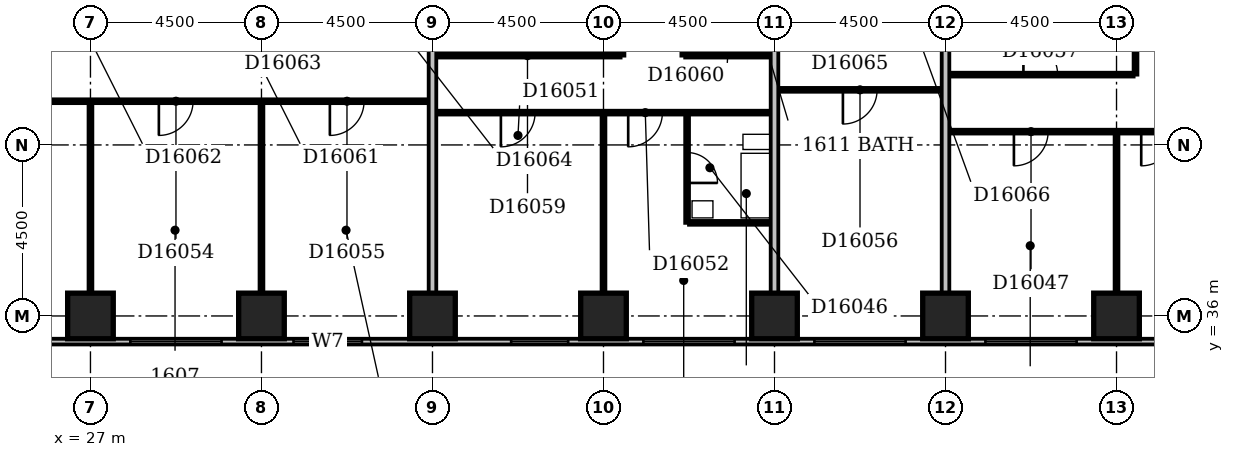
"""IFC4 building model, lengths in metres.
Left out: names, types, materials, properties, quantities, classifications, styles, units other than length and angle.
Written with IfcOpenShell. Run it as: python <this file> out.ifc"""

import sys

from ifc_helpers import new_model, si_unit, direction, frame, frame_2d, origin, origin_2d, place, context, subcontext, project, spatial, rectangle, extrude, element, fill, save


model = new_model("IFC4")
c1 = context("Model", 3, precision=1e-05, world=origin(), true_north=direction((0.0, 1.0)))
c2 = subcontext(c1, "Body", "Model", "MODEL_VIEW")
j1 = project(units=[si_unit("LENGTHUNIT", "METRE"), si_unit("PLANEANGLEUNIT", "RADIAN")], contexts=[c1])
p1 = place(None, origin())
s1 = spatial("IfcSite", under=j1, at=p1, CompositionType="ELEMENT")
p2 = place(p1, origin())
s2 = spatial("IfcBuilding", under=s1, at=p2, CompositionType="ELEMENT")
p3 = place(p2, frame((0.0, 0.0, 68.6)))
s3 = spatial("IfcBuildingStorey", under=s2, at=p3, CompositionType="ELEMENT", Elevation=68.6)
for number, where, z_axis, x_axis in (
    (1, (27.0, 36.0, -0.3), (0.0, 0.0, 1.0), (1.0, 0.0, 0.0)),
    (2, (31.5, 36.0, -0.3), (0.0, 0.0, 1.0), (1.0, 0.0, 0.0)),
    (3, (36.0, 36.0, -0.3), (0.0, 0.0, 1.0), (1.0, 0.0, 0.0)),
    (4, (40.5, 36.0, -0.3), (0.0, 0.0, 1.0), (1.0, 0.0, 0.0)),
    (5, (45.0, 36.0, -0.3), (0.0, 0.0, 1.0), (1.0, 0.0, 0.0)),
    (6, (49.5, 36.0, -0.3), (0.0, 0.0, 1.0), (1.0, 0.0, 0.0)),
    (7, (54.0, 36.0, -0.3), (0.0, 0.0, 1.0), (1.0, 0.0, 0.0)),
):
    element("IfcColumn", number, at=place(p3, frame(where, z_axis=z_axis, x_axis=x_axis)), inside=s3, PredefinedType="COLUMN", context=c2, shape_type="SweptSolid", body=[
        extrude(rectangle(XDim=1.2, YDim=1.2, at=origin_2d()), origin(), (0.0, 0.0, 1.0), 3.6),
    ])
p4 = place(p3, frame((23.1, 35.325, 0.0), z_axis=(0.0, 0.0, 1.0), x_axis=(1.0, 0.0, 0.0)))
e8 = element("IfcWall", 8, at=p4, inside=s3, PredefinedType="STANDARD", context=c2, shape_type="SweptSolid", body=[
    extrude(rectangle(XDim=45.15, YDim=0.15, at=frame_2d((22.575, 0.0))), origin(), (0.0, 0.0, 1.0), 2.7),
])
p5 = place(p4, frame((0.45, 0.0, 0.6)))
e9 = element("IfcOpeningElement", 9, at=p5, cuts=e8, PredefinedType="OPENING", context=c2, shape_type="SweptSolid", body=[
    extrude(rectangle(XDim=2.4, YDim=1.8, at=frame_2d((1.2, 0.9))), frame((0.0, 0.087, 0.0), z_axis=(0.0, -1.0, 0.0), x_axis=(1.0, 0.0, 0.0)), (0.0, 0.0, 1.0), 0.174),
])
p6 = place(p4, frame((4.95, 0.0, 0.6)))
e10 = element("IfcOpeningElement", 10, at=p6, cuts=e8, PredefinedType="OPENING", context=c2, shape_type="SweptSolid", body=[
    extrude(rectangle(XDim=2.4, YDim=1.8, at=frame_2d((1.2, 0.9))), frame((0.0, 0.087, 0.0), z_axis=(0.0, -1.0, 0.0), x_axis=(1.0, 0.0, 0.0)), (0.0, 0.0, 1.0), 0.174),
])
p7 = place(p4, frame((9.243, 0.0, 0.6)))
e11 = element("IfcOpeningElement", 11, at=p7, cuts=e8, PredefinedType="OPENING", context=c2, shape_type="SweptSolid", body=[
    extrude(rectangle(XDim=1.8, YDim=1.8, at=frame_2d((0.9, 0.9))), frame((0.0, 0.087, 0.0), z_axis=(0.0, -1.0, 0.0), x_axis=(1.0, 0.0, 0.0)), (0.0, 0.0, 1.0), 0.174),
])
p8 = place(p4, frame((14.97, 0.0, 0.6)))
e12 = element("IfcOpeningElement", 12, at=p8, cuts=e8, PredefinedType="OPENING", context=c2, shape_type="SweptSolid", body=[
    extrude(rectangle(XDim=1.5, YDim=1.8, at=frame_2d((0.75, 0.9))), frame((0.0, 0.087, 0.0), z_axis=(0.0, -1.0, 0.0), x_axis=(1.0, 0.0, 0.0)), (0.0, 0.0, 1.0), 0.174),
])
p9 = place(p4, frame((18.45, 0.0, 0.6)))
e13 = element("IfcOpeningElement", 13, at=p9, cuts=e8, PredefinedType="OPENING", context=c2, shape_type="SweptSolid", body=[
    extrude(rectangle(XDim=2.4, YDim=1.8, at=frame_2d((1.2, 0.9))), frame((0.0, 0.087, 0.0), z_axis=(0.0, -1.0, 0.0), x_axis=(1.0, 0.0, 0.0)), (0.0, 0.0, 1.0), 0.174),
])
p10 = place(p4, frame((22.95, 0.0, 0.6)))
e14 = element("IfcOpeningElement", 14, at=p10, cuts=e8, PredefinedType="OPENING", context=c2, shape_type="SweptSolid", body=[
    extrude(rectangle(XDim=2.4, YDim=1.8, at=frame_2d((1.2, 0.9))), frame((0.0, 0.087, 0.0), z_axis=(0.0, -1.0, 0.0), x_axis=(1.0, 0.0, 0.0)), (0.0, 0.0, 1.0), 0.174),
])
p11 = place(p4, frame((27.45, 0.0, 0.6)))
e15 = element("IfcOpeningElement", 15, at=p11, cuts=e8, PredefinedType="OPENING", context=c2, shape_type="SweptSolid", body=[
    extrude(rectangle(XDim=2.4, YDim=1.8, at=frame_2d((1.2, 0.9))), frame((0.0, 0.087, 0.0), z_axis=(0.0, -1.0, 0.0), x_axis=(1.0, 0.0, 0.0)), (0.0, 0.0, 1.0), 0.174),
])
p12 = place(p4, frame((31.95, 0.0, 0.6)))
e16 = element("IfcOpeningElement", 16, at=p12, cuts=e8, PredefinedType="OPENING", context=c2, shape_type="SweptSolid", body=[
    extrude(rectangle(XDim=2.4, YDim=1.8, at=frame_2d((1.2, 0.9))), frame((0.0, 0.087, 0.0), z_axis=(0.0, -1.0, 0.0), x_axis=(1.0, 0.0, 0.0)), (0.0, 0.0, 1.0), 0.174),
])
p13 = place(p4, frame((36.45, 0.0, 0.6)))
e17 = element("IfcOpeningElement", 17, at=p13, cuts=e8, PredefinedType="OPENING", context=c2, shape_type="SweptSolid", body=[
    extrude(rectangle(XDim=2.4, YDim=1.8, at=frame_2d((1.2, 0.9))), frame((0.0, 0.087, 0.0), z_axis=(0.0, -1.0, 0.0), x_axis=(1.0, 0.0, 0.0)), (0.0, 0.0, 1.0), 0.174),
])
p14 = place(p4, frame((40.706, 0.0, 0.6)))
e18 = element("IfcOpeningElement", 18, at=p14, cuts=e8, PredefinedType="OPENING", context=c2, shape_type="SweptSolid", body=[
    extrude(rectangle(XDim=1.2, YDim=1.8, at=frame_2d((0.6, 0.9))), frame((0.0, 0.087, 0.0), z_axis=(0.0, -1.0, 0.0), x_axis=(1.0, 0.0, 0.0)), (0.0, 0.0, 1.0), 0.174),
])
p15 = place(p3, frame((27.0, 36.6, 0.0), z_axis=(0.0, 0.0, 1.0), x_axis=(0.0, 1.0, 0.0)))
e19 = element("IfcWall", 19, at=p15, inside=s3, PredefinedType="PARTITIONING", context=c2, shape_type="SweptSolid", body=[
    extrude(rectangle(XDim=5.0, YDim=0.1, at=frame_2d((2.5, 0.0))), origin(), (0.0, 0.0, 1.0), 2.6),
])
p16 = place(p3, frame((31.5, 36.6, 0.0), z_axis=(0.0, 0.0, 1.0), x_axis=(0.0, 1.0, 0.0)))
e20 = element("IfcWall", 20, at=p16, inside=s3, PredefinedType="PARTITIONING", context=c2, shape_type="SweptSolid", body=[
    extrude(rectangle(XDim=5.0, YDim=0.1, at=frame_2d((2.5, 0.0))), origin(), (0.0, 0.0, 1.0), 3.3),
])
p17 = place(p3, frame((36.0, 36.6, 0.0), z_axis=(0.0, 0.0, 1.0), x_axis=(0.0, 1.0, 0.0)))
e21 = element("IfcWall", 21, at=p17, inside=s3, PredefinedType="PARTITIONING", context=c2, shape_type="SweptSolid", body=[
    extrude(rectangle(XDim=12.8, YDim=0.2, at=frame_2d((6.4, 0.0))), origin(), (0.0, 0.0, 1.0), 2.4),
])
p18 = place(p3, frame((40.5, 36.6, 0.0), z_axis=(0.0, 0.0, 1.0), x_axis=(0.0, 1.0, 0.0)))
e22 = element("IfcWall", 22, at=p18, inside=s3, PredefinedType="PARTITIONING", context=c2, shape_type="SweptSolid", body=[
    extrude(rectangle(XDim=4.7, YDim=0.1, at=frame_2d((2.35, 0.0))), origin(), (0.0, 0.0, 1.0), 3.3),
])
p19 = place(p3, frame((45.0, 36.6, 0.0), z_axis=(0.0, 0.0, 1.0), x_axis=(0.0, 1.0, 0.0)))
e23 = element("IfcWall", 23, at=p19, inside=s3, PredefinedType="PARTITIONING", context=c2, shape_type="SweptSolid", body=[
    extrude(rectangle(XDim=12.8, YDim=0.2, at=frame_2d((6.4, 0.0))), origin(), (0.0, 0.0, 1.0), 2.6),
])
p20 = place(p3, frame((49.5, 36.6, 0.0), z_axis=(0.0, 0.0, 1.0), x_axis=(0.0, 1.0, 0.0)))
e24 = element("IfcWall", 24, at=p20, inside=s3, PredefinedType="PARTITIONING", context=c2, shape_type="SweptSolid", body=[
    extrude(rectangle(XDim=12.8, YDim=0.2, at=frame_2d((6.4, 0.0))), origin(), (0.0, 0.0, 1.0), 3.3),
])
p21 = place(p3, frame((54.0, 36.6, 0.0), z_axis=(0.0, 0.0, 1.0), x_axis=(0.0, 1.0, 0.0)))
e25 = element("IfcWall", 25, at=p21, inside=s3, PredefinedType="PARTITIONING", context=c2, shape_type="SweptSolid", body=[
    extrude(rectangle(XDim=4.2, YDim=0.1, at=frame_2d((2.1, 0.0))), origin(), (0.0, 0.0, 1.0), 2.6),
])
p22 = place(p3, frame((42.7, 38.45, 0.0), z_axis=(0.0, 0.0, 1.0), x_axis=(0.0, 1.0, 0.0)))
e26 = element("IfcWall", 26, at=p22, inside=s3, PredefinedType="PLUMBINGWALL", context=c2, shape_type="SweptSolid", body=[
    extrude(rectangle(XDim=2.85, YDim=0.1, at=frame_2d((1.425, 0.0))), origin(), (0.0, 0.0, 1.0), 3.3),
])
p23 = place(p22, frame((1.05, 0.0, 0.0)))
e27 = element("IfcOpeningElement", 27, at=p23, cuts=e26, PredefinedType="OPENING", context=c2, shape_type="SweptSolid", body=[
    extrude(rectangle(XDim=0.8, YDim=2.1, at=frame_2d((0.4, 1.05))), frame((0.0, 0.062, 0.0), z_axis=(0.0, -1.0, 0.0), x_axis=(1.0, 0.0, 0.0)), (0.0, 0.0, 1.0), 0.124),
])
p24 = place(p3, frame((42.75, 38.45, 0.0), z_axis=(0.0, 0.0, 1.0), x_axis=(1.0, 0.0, 0.0)))
e28 = element("IfcWall", 28, at=p24, inside=s3, PredefinedType="PLUMBINGWALL", context=c2, shape_type="SweptSolid", body=[
    extrude(rectangle(XDim=2.15, YDim=0.1, at=frame_2d((1.075, 0.0))), origin(), (0.0, 0.0, 1.0), 3.3),
])
p25 = place(p3, frame((49.6, 40.85, 0.0), z_axis=(0.0, 0.0, 1.0), x_axis=(1.0, 0.0, 0.0)))
e29 = element("IfcWall", 29, at=p25, inside=s3, PredefinedType="PARTITIONING", context=c2, shape_type="SweptSolid", body=[
    extrude(rectangle(XDim=8.8, YDim=0.1, at=frame_2d((4.4, 0.0))), origin(), (0.0, 0.0, 1.0), 3.3),
])
p26 = place(p25, frame((1.7, 0.0, 0.0)))
e30 = element("IfcOpeningElement", 30, at=p26, cuts=e29, PredefinedType="OPENING", context=c2, shape_type="SweptSolid", body=[
    extrude(rectangle(XDim=0.9, YDim=2.1, at=frame_2d((0.45, 1.05))), frame((0.0, 0.062, 0.0), z_axis=(0.0, -1.0, 0.0), x_axis=(1.0, 0.0, 0.0)), (0.0, 0.0, 1.0), 0.124),
])
p27 = place(p25, frame((5.05, 0.0, 0.0)))
e31 = element("IfcOpeningElement", 31, at=p27, cuts=e29, PredefinedType="OPENING", context=c2, shape_type="SweptSolid", body=[
    extrude(rectangle(XDim=0.9, YDim=2.1, at=frame_2d((0.45, 1.05))), frame((0.0, 0.062, 0.0), z_axis=(0.0, -1.0, 0.0), x_axis=(1.0, 0.0, 0.0)), (0.0, 0.0, 1.0), 0.124),
])
p28 = place(p3, frame((36.1, 41.35, 0.0), z_axis=(0.0, 0.0, 1.0), x_axis=(1.0, 0.0, 0.0)))
e32 = element("IfcWall", 32, at=p28, inside=s3, PredefinedType="PARTITIONING", context=c2, shape_type="SweptSolid", body=[
    extrude(rectangle(XDim=8.8, YDim=0.1, at=frame_2d((4.4, 0.0))), origin(), (0.0, 0.0, 1.0), 3.3),
])
p29 = place(p28, frame((1.7, 0.0, 0.0)))
e33 = element("IfcOpeningElement", 33, at=p29, cuts=e32, PredefinedType="OPENING", context=c2, shape_type="SweptSolid", body=[
    extrude(rectangle(XDim=0.9, YDim=2.1, at=frame_2d((0.45, 1.05))), frame((0.0, 0.062, 0.0), z_axis=(0.0, -1.0, 0.0), x_axis=(1.0, 0.0, 0.0)), (0.0, 0.0, 1.0), 0.124),
])
p30 = place(p28, frame((5.05, 0.0, 0.0)))
e34 = element("IfcOpeningElement", 34, at=p30, cuts=e32, PredefinedType="OPENING", context=c2, shape_type="SweptSolid", body=[
    extrude(rectangle(XDim=0.9, YDim=2.1, at=frame_2d((0.45, 1.05))), frame((0.0, 0.062, 0.0), z_axis=(0.0, -1.0, 0.0), x_axis=(1.0, 0.0, 0.0)), (0.0, 0.0, 1.0), 0.124),
])
p31 = place(p3, frame((22.6, 41.65, 0.0), z_axis=(0.0, 0.0, 1.0), x_axis=(1.0, 0.0, 0.0)))
e35 = element("IfcWall", 35, at=p31, inside=s3, PredefinedType="PARTITIONING", context=c2, shape_type="SweptSolid", body=[
    extrude(rectangle(XDim=13.3, YDim=0.1, at=frame_2d((6.65, 0.0))), origin(), (0.0, 0.0, 1.0), 3.3),
])
p32 = place(p31, frame((1.7, 0.0, 0.0)))
e36 = element("IfcOpeningElement", 36, at=p32, cuts=e35, PredefinedType="OPENING", context=c2, shape_type="SweptSolid", body=[
    extrude(rectangle(XDim=0.9, YDim=2.1, at=frame_2d((0.45, 1.05))), frame((0.0, 0.062, 0.0), z_axis=(0.0, -1.0, 0.0), x_axis=(1.0, 0.0, 0.0)), (0.0, 0.0, 1.0), 0.124),
])
p33 = place(p31, frame((6.2, 0.0, 0.0)))
e37 = element("IfcOpeningElement", 37, at=p33, cuts=e35, PredefinedType="OPENING", context=c2, shape_type="SweptSolid", body=[
    extrude(rectangle(XDim=0.9, YDim=2.1, at=frame_2d((0.45, 1.05))), frame((0.0, 0.062, 0.0), z_axis=(0.0, -1.0, 0.0), x_axis=(1.0, 0.0, 0.0)), (0.0, 0.0, 1.0), 0.124),
])
p34 = place(p31, frame((10.7, 0.0, 0.0)))
e38 = element("IfcOpeningElement", 38, at=p34, cuts=e35, PredefinedType="OPENING", context=c2, shape_type="SweptSolid", body=[
    extrude(rectangle(XDim=0.9, YDim=2.1, at=frame_2d((0.45, 1.05))), frame((0.0, 0.062, 0.0), z_axis=(0.0, -1.0, 0.0), x_axis=(1.0, 0.0, 0.0)), (0.0, 0.0, 1.0), 0.124),
])
p35 = place(p3, frame((45.1, 41.95, 0.0), z_axis=(0.0, 0.0, 1.0), x_axis=(1.0, 0.0, 0.0)))
e39 = element("IfcWall", 39, at=p35, inside=s3, PredefinedType="PARTITIONING", context=c2, shape_type="SweptSolid", body=[
    extrude(rectangle(XDim=4.3, YDim=0.1, at=frame_2d((2.15, 0.0))), origin(), (0.0, 0.0, 1.0), 3.3),
])
p36 = place(p35, frame((1.7, 0.0, 0.0)))
e40 = element("IfcOpeningElement", 40, at=p36, cuts=e39, PredefinedType="OPENING", context=c2, shape_type="SweptSolid", body=[
    extrude(rectangle(XDim=0.9, YDim=2.1, at=frame_2d((0.45, 1.05))), frame((0.0, 0.062, 0.0), z_axis=(0.0, -1.0, 0.0), x_axis=(1.0, 0.0, 0.0)), (0.0, 0.0, 1.0), 0.124),
])
p37 = place(p3, frame((49.6, 42.35, 0.0), z_axis=(0.0, 0.0, 1.0), x_axis=(1.0, 0.0, 0.0)))
e41 = element("IfcWall", 41, at=p37, inside=s3, PredefinedType="PARTITIONING", context=c2, shape_type="SweptSolid", body=[
    extrude(rectangle(XDim=4.85, YDim=0.1, at=frame_2d((2.425, 0.0))), origin(), (0.0, 0.0, 1.0), 3.3),
])
p38 = place(p37, frame((1.95, 0.0, 0.0)))
e42 = element("IfcOpeningElement", 42, at=p38, cuts=e41, PredefinedType="OPENING", context=c2, shape_type="SweptSolid", body=[
    extrude(rectangle(XDim=0.9, YDim=2.1, at=frame_2d((0.45, 1.05))), frame((0.0, 0.062, 0.0), z_axis=(0.0, -1.0, 0.0), x_axis=(1.0, 0.0, 0.0)), (0.0, 0.0, 1.0), 0.124),
])
p39 = place(p3, frame((54.5, 42.35, 0.0), z_axis=(0.0, 0.0, 1.0), x_axis=(0.0, 1.0, 0.0)))
e43 = element("IfcWall", 43, at=p39, inside=s3, PredefinedType="PARTITIONING", context=c2, shape_type="SweptSolid", body=[
    extrude(rectangle(XDim=7.05, YDim=0.1, at=frame_2d((3.525, 0.0))), origin(), (0.0, 0.0, 1.0), 2.6),
])
p40 = place(p3, frame((36.1, 42.85, 0.0), z_axis=(0.0, 0.0, 1.0), x_axis=(1.0, 0.0, 0.0)))
e44 = element("IfcWall", 44, at=p40, inside=s3, PredefinedType="PARTITIONING", context=c2, shape_type="SweptSolid", body=[
    extrude(rectangle(XDim=4.85, YDim=0.1, at=frame_2d((2.425, 0.0))), origin(), (0.0, 0.0, 1.0), 3.3),
])
p41 = place(p40, frame((1.95, 0.0, 0.0)))
e45 = element("IfcOpeningElement", 45, at=p41, cuts=e44, PredefinedType="OPENING", context=c2, shape_type="SweptSolid", body=[
    extrude(rectangle(XDim=0.9, YDim=2.1, at=frame_2d((0.45, 1.05))), frame((0.0, 0.062, 0.0), z_axis=(0.0, -1.0, 0.0), x_axis=(1.0, 0.0, 0.0)), (0.0, 0.0, 1.0), 0.124),
])
p42 = place(p3, frame((41.0, 42.85, 0.0), z_axis=(0.0, 0.0, 1.0), x_axis=(0.0, 1.0, 0.0)))
e46 = element("IfcWall", 46, at=p42, inside=s3, PredefinedType="PARTITIONING", context=c2, shape_type="SweptSolid", body=[
    extrude(rectangle(XDim=6.55, YDim=0.1, at=frame_2d((3.275, 0.0))), origin(), (0.0, 0.0, 1.0), 3.3),
])
p43 = place(p3, frame((42.6, 42.85, 0.0), z_axis=(0.0, 0.0, 1.0), x_axis=(0.0, 1.0, 0.0)))
e47 = element("IfcWall", 47, at=p43, inside=s3, PredefinedType="PLUMBINGWALL", context=c2, shape_type="SweptSolid", body=[
    extrude(rectangle(XDim=6.55, YDim=0.1, at=frame_2d((3.275, 0.0))), origin(), (0.0, 0.0, 1.0), 3.3),
])
p44 = place(p3, frame((42.65, 42.85, 0.0), z_axis=(0.0, 0.0, 1.0), x_axis=(1.0, 0.0, 0.0)))
e48 = element("IfcWall", 48, at=p44, inside=s3, PredefinedType="PARTITIONING", context=c2, shape_type="SweptSolid", body=[
    extrude(rectangle(XDim=2.25, YDim=0.1, at=frame_2d((1.125, 0.0))), origin(), (0.0, 0.0, 1.0), 3.3),
])
p45 = place(p44, frame((0.75, 0.0, 0.0)))
e49 = element("IfcOpeningElement", 49, at=p45, cuts=e48, PredefinedType="OPENING", context=c2, shape_type="SweptSolid", body=[
    extrude(rectangle(XDim=0.8, YDim=2.1, at=frame_2d((0.4, 1.05))), frame((0.0, 0.062, 0.0), z_axis=(0.0, -1.0, 0.0), x_axis=(1.0, 0.0, 0.0)), (0.0, 0.0, 1.0), 0.124),
])
p46 = place(p6, origin())
e50 = element("IfcWindow", 50, at=p46, inside=s3, PartitioningType="SINGLE_PANEL", PredefinedType="WINDOW", context=c2, shape_type="SweptSolid", body=[
    extrude(rectangle(XDim=2.4, YDim=1.8, at=frame_2d((1.2, 0.9))), frame((0.0, 0.03, 0.0), z_axis=(0.0, -1.0, 0.0), x_axis=(1.0, 0.0, 0.0)), (0.0, 0.0, 1.0), 0.06),
])
fill(e10, e50)
p47 = place(p7, origin())
e51 = element("IfcWindow", 51, at=p47, inside=s3, PartitioningType="SINGLE_PANEL", PredefinedType="WINDOW", context=c2, shape_type="SweptSolid", body=[
    extrude(rectangle(XDim=1.8, YDim=1.8, at=frame_2d((0.9, 0.9))), frame((0.0, 0.03, 0.0), z_axis=(0.0, -1.0, 0.0), x_axis=(1.0, 0.0, 0.0)), (0.0, 0.0, 1.0), 0.06),
])
fill(e11, e51)
p48 = place(p8, origin())
e52 = element("IfcWindow", 52, at=p48, inside=s3, PartitioningType="SINGLE_PANEL", PredefinedType="WINDOW", context=c2, shape_type="SweptSolid", body=[
    extrude(rectangle(XDim=1.5, YDim=1.8, at=frame_2d((0.75, 0.9))), frame((0.0, 0.03, 0.0), z_axis=(0.0, -1.0, 0.0), x_axis=(1.0, 0.0, 0.0)), (0.0, 0.0, 1.0), 0.06),
])
fill(e12, e52)
p49 = place(p9, origin())
e53 = element("IfcWindow", 53, at=p49, inside=s3, PartitioningType="SINGLE_PANEL", PredefinedType="WINDOW", context=c2, shape_type="SweptSolid", body=[
    extrude(rectangle(XDim=2.4, YDim=1.8, at=frame_2d((1.2, 0.9))), frame((0.0, 0.03, 0.0), z_axis=(0.0, -1.0, 0.0), x_axis=(1.0, 0.0, 0.0)), (0.0, 0.0, 1.0), 0.06),
])
fill(e13, e53)
p50 = place(p10, origin())
e54 = element("IfcWindow", 54, at=p50, inside=s3, PartitioningType="SINGLE_PANEL", PredefinedType="WINDOW", context=c2, shape_type="SweptSolid", body=[
    extrude(rectangle(XDim=2.4, YDim=1.8, at=frame_2d((1.2, 0.9))), frame((0.0, 0.03, 0.0), z_axis=(0.0, -1.0, 0.0), x_axis=(1.0, 0.0, 0.0)), (0.0, 0.0, 1.0), 0.06),
])
fill(e14, e54)
p51 = place(p11, origin())
e55 = element("IfcWindow", 55, at=p51, inside=s3, PartitioningType="SINGLE_PANEL", PredefinedType="WINDOW", context=c2, shape_type="SweptSolid", body=[
    extrude(rectangle(XDim=2.4, YDim=1.8, at=frame_2d((1.2, 0.9))), frame((0.0, 0.03, 0.0), z_axis=(0.0, -1.0, 0.0), x_axis=(1.0, 0.0, 0.0)), (0.0, 0.0, 1.0), 0.06),
])
fill(e15, e55)
p52 = place(p23, frame((0.8, 0.0, 0.0), z_axis=(0.0, 0.0, 1.0), x_axis=(-1.0, 0.0, 0.0)))
e56 = element("IfcDoor", 56, at=p52, inside=s3, OperationType="SINGLE_SWING_RIGHT", PredefinedType="DOOR", context=c2, shape_type="SweptSolid", body=[
    extrude(rectangle(XDim=0.8, YDim=2.1, at=frame_2d((0.4, 1.05))), frame((0.0, 0.025, 0.0), z_axis=(0.0, -1.0, 0.0), x_axis=(1.0, 0.0, 0.0)), (0.0, 0.0, 1.0), 0.05),
])
fill(e27, e56)
p53 = place(p26, frame((0.9, 0.0, 0.0), z_axis=(0.0, 0.0, 1.0), x_axis=(-1.0, 0.0, 0.0)))
e57 = element("IfcDoor", 57, at=p53, inside=s3, OperationType="SINGLE_SWING_RIGHT", PredefinedType="DOOR", context=c2, shape_type="SweptSolid", body=[
    extrude(rectangle(XDim=0.9, YDim=2.1, at=frame_2d((0.45, 1.05))), frame((0.0, 0.025, 0.0), z_axis=(0.0, -1.0, 0.0), x_axis=(1.0, 0.0, 0.0)), (0.0, 0.0, 1.0), 0.05),
])
fill(e30, e57)
p54 = place(p27, frame((0.9, 0.0, 0.0), z_axis=(0.0, 0.0, 1.0), x_axis=(-1.0, 0.0, 0.0)))
e58 = element("IfcDoor", 58, at=p54, inside=s3, OperationType="SINGLE_SWING_RIGHT", PredefinedType="DOOR", context=c2, shape_type="SweptSolid", body=[
    extrude(rectangle(XDim=0.9, YDim=2.1, at=frame_2d((0.45, 1.05))), frame((0.0, 0.025, 0.0), z_axis=(0.0, -1.0, 0.0), x_axis=(1.0, 0.0, 0.0)), (0.0, 0.0, 1.0), 0.05),
])
fill(e31, e58)
p55 = place(p29, frame((0.9, 0.0, 0.0), z_axis=(0.0, 0.0, 1.0), x_axis=(-1.0, 0.0, 0.0)))
e59 = element("IfcDoor", 59, at=p55, inside=s3, OperationType="SINGLE_SWING_RIGHT", PredefinedType="DOOR", context=c2, shape_type="SweptSolid", body=[
    extrude(rectangle(XDim=0.9, YDim=2.1, at=frame_2d((0.45, 1.05))), frame((0.0, 0.025, 0.0), z_axis=(0.0, -1.0, 0.0), x_axis=(1.0, 0.0, 0.0)), (0.0, 0.0, 1.0), 0.05),
])
fill(e33, e59)
p56 = place(p30, frame((0.9, 0.0, 0.0), z_axis=(0.0, 0.0, 1.0), x_axis=(-1.0, 0.0, 0.0)))
e60 = element("IfcDoor", 60, at=p56, inside=s3, OperationType="SINGLE_SWING_RIGHT", PredefinedType="DOOR", context=c2, shape_type="SweptSolid", body=[
    extrude(rectangle(XDim=0.9, YDim=2.1, at=frame_2d((0.45, 1.05))), frame((0.0, 0.025, 0.0), z_axis=(0.0, -1.0, 0.0), x_axis=(1.0, 0.0, 0.0)), (0.0, 0.0, 1.0), 0.05),
])
fill(e34, e60)
p57 = place(p33, frame((0.9, 0.0, 0.0), z_axis=(0.0, 0.0, 1.0), x_axis=(-1.0, 0.0, 0.0)))
e61 = element("IfcDoor", 61, at=p57, inside=s3, OperationType="SINGLE_SWING_RIGHT", PredefinedType="DOOR", context=c2, shape_type="SweptSolid", body=[
    extrude(rectangle(XDim=0.9, YDim=2.1, at=frame_2d((0.45, 1.05))), frame((0.0, 0.025, 0.0), z_axis=(0.0, -1.0, 0.0), x_axis=(1.0, 0.0, 0.0)), (0.0, 0.0, 1.0), 0.05),
])
fill(e37, e61)
p58 = place(p34, frame((0.9, 0.0, 0.0), z_axis=(0.0, 0.0, 1.0), x_axis=(-1.0, 0.0, 0.0)))
e62 = element("IfcDoor", 62, at=p58, inside=s3, OperationType="SINGLE_SWING_RIGHT", PredefinedType="DOOR", context=c2, shape_type="SweptSolid", body=[
    extrude(rectangle(XDim=0.9, YDim=2.1, at=frame_2d((0.45, 1.05))), frame((0.0, 0.025, 0.0), z_axis=(0.0, -1.0, 0.0), x_axis=(1.0, 0.0, 0.0)), (0.0, 0.0, 1.0), 0.05),
])
fill(e38, e62)
p59 = place(p36, frame((0.9, 0.0, 0.0), z_axis=(0.0, 0.0, 1.0), x_axis=(-1.0, 0.0, 0.0)))
e63 = element("IfcDoor", 63, at=p59, inside=s3, OperationType="SINGLE_SWING_RIGHT", PredefinedType="DOOR", context=c2, shape_type="SweptSolid", body=[
    extrude(rectangle(XDim=0.9, YDim=2.1, at=frame_2d((0.45, 1.05))), frame((0.0, 0.025, 0.0), z_axis=(0.0, -1.0, 0.0), x_axis=(1.0, 0.0, 0.0)), (0.0, 0.0, 1.0), 0.05),
])
fill(e40, e63)
p60 = place(p38, origin())
e64 = element("IfcDoor", 64, at=p60, inside=s3, OperationType="SINGLE_SWING_LEFT", PredefinedType="DOOR", context=c2, shape_type="SweptSolid", body=[
    extrude(rectangle(XDim=0.9, YDim=2.1, at=frame_2d((0.45, 1.05))), frame((0.0, 0.025, 0.0), z_axis=(0.0, -1.0, 0.0), x_axis=(1.0, 0.0, 0.0)), (0.0, 0.0, 1.0), 0.05),
])
fill(e42, e64)
p61 = place(p41, origin())
e65 = element("IfcDoor", 65, at=p61, inside=s3, OperationType="SINGLE_SWING_LEFT", PredefinedType="DOOR", context=c2, shape_type="SweptSolid", body=[
    extrude(rectangle(XDim=0.9, YDim=2.1, at=frame_2d((0.45, 1.05))), frame((0.0, 0.025, 0.0), z_axis=(0.0, -1.0, 0.0), x_axis=(1.0, 0.0, 0.0)), (0.0, 0.0, 1.0), 0.05),
])
fill(e45, e65)
p62 = place(p45, origin())
e66 = element("IfcDoor", 66, at=p62, inside=s3, OperationType="SINGLE_SWING_LEFT", PredefinedType="DOOR", context=c2, shape_type="SweptSolid", body=[
    extrude(rectangle(XDim=0.8, YDim=2.1, at=frame_2d((0.4, 1.05))), frame((0.0, 0.025, 0.0), z_axis=(0.0, -1.0, 0.0), x_axis=(1.0, 0.0, 0.0)), (0.0, 0.0, 1.0), 0.05),
])
fill(e49, e66)
save(model, sys.argv[1])
